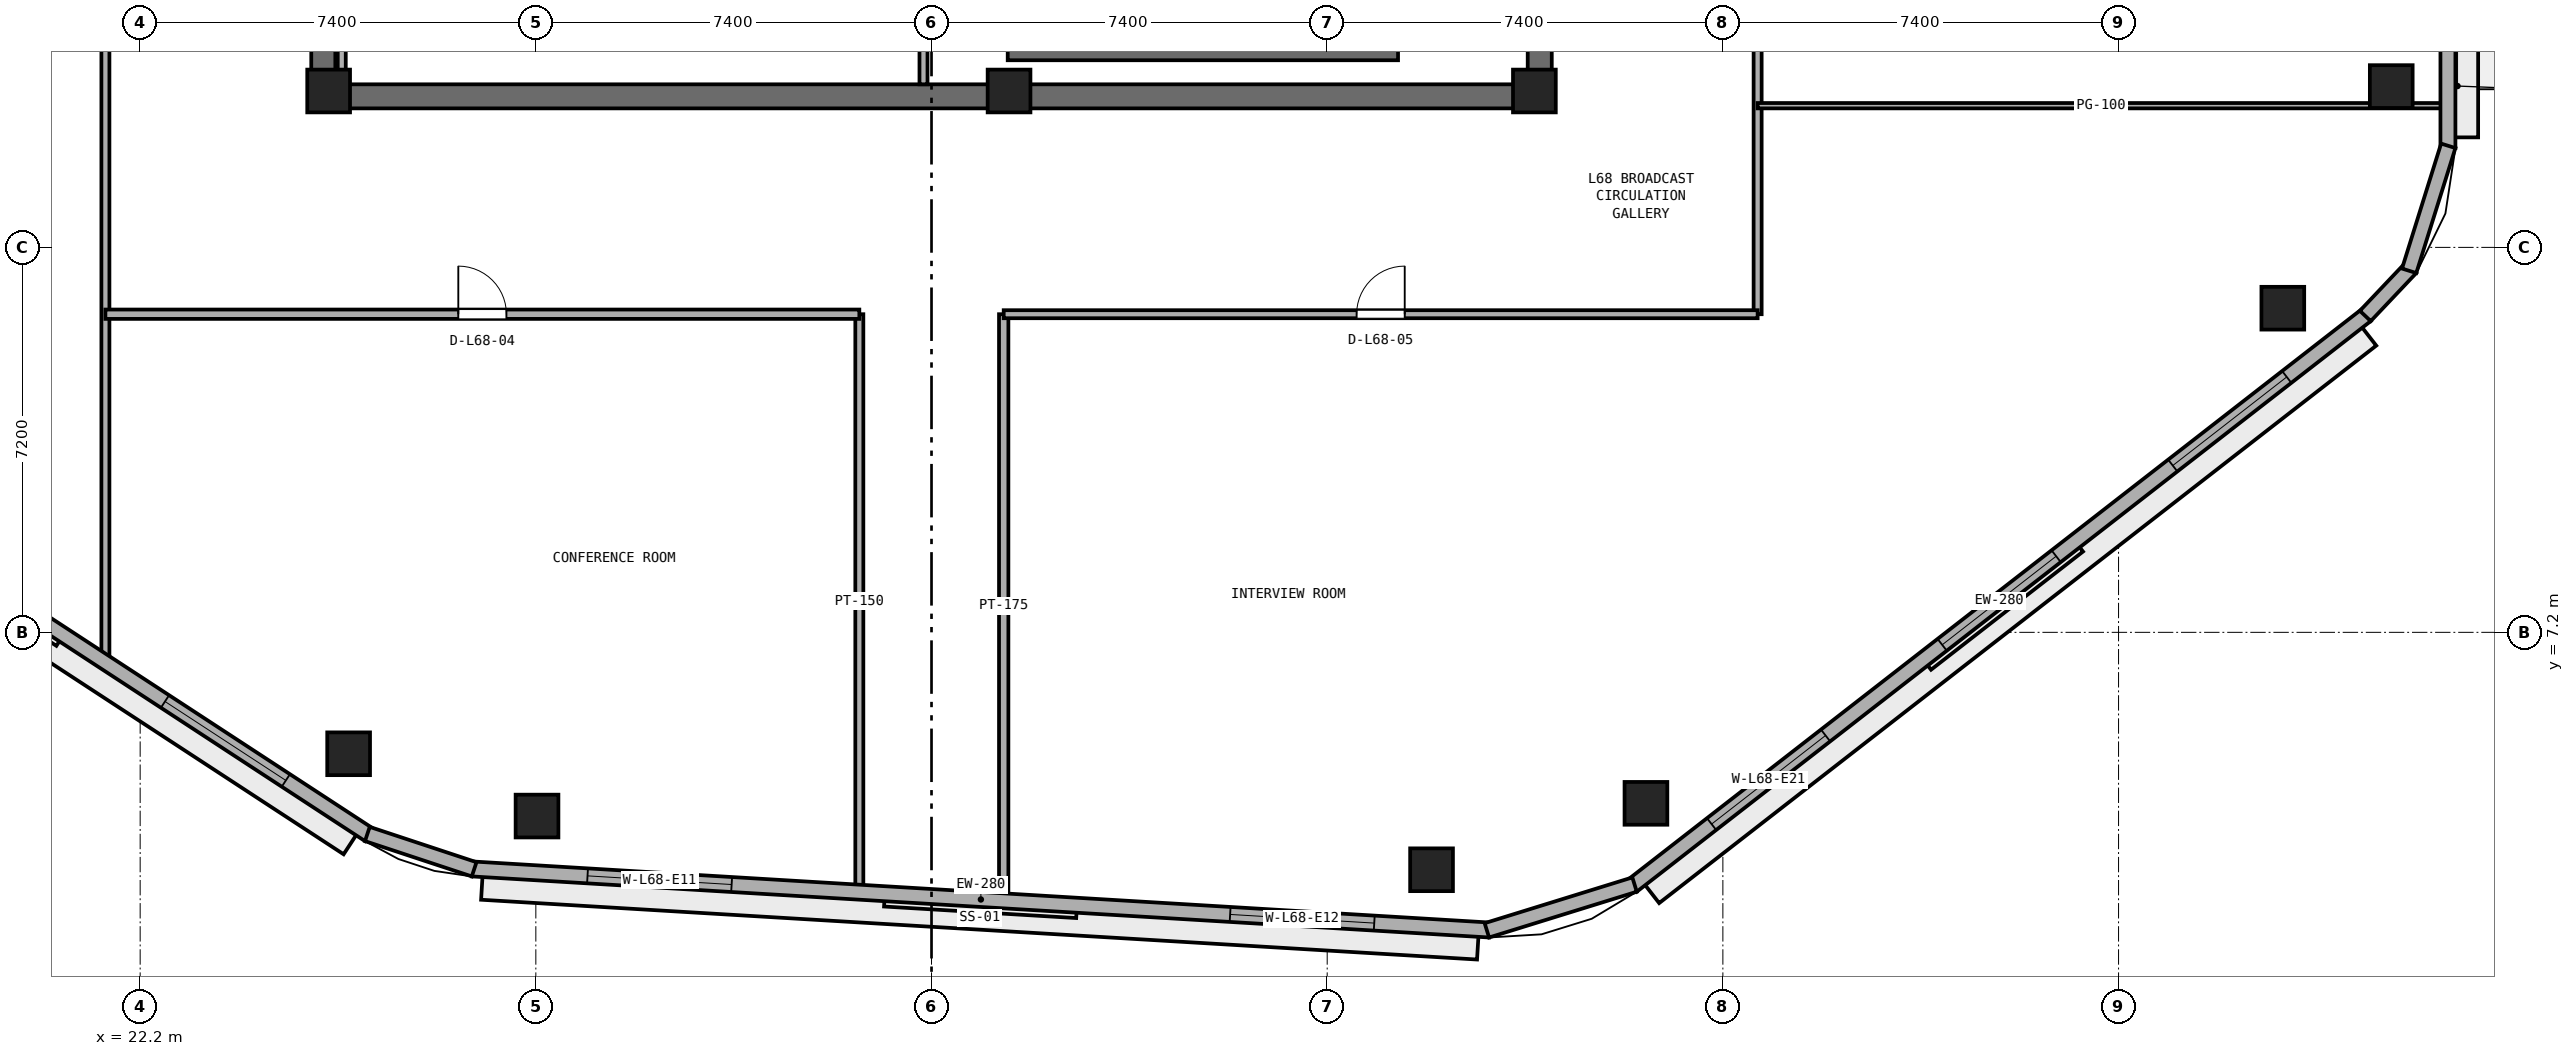
"""IFC4 building model, lengths in metres.
Left out: names, types, materials, properties, quantities, classifications, styles, units other than length and angle.
Written with IfcOpenShell. Run it as: python <this file> out.ifc"""

import sys

from ifc_helpers import new_model, si_unit, direction, frame, frame_2d, origin, origin_2d, place, context, subcontext, project, spatial, rectangle, extrude, element, fill, save


model = new_model("IFC4")
c1 = context("Model", 3, precision=1e-05, world=origin(), true_north=direction((0.0, 1.0)))
c2 = subcontext(c1, "Body", "Model", "MODEL_VIEW")
j1 = project(units=[si_unit("LENGTHUNIT", "METRE"), si_unit("PLANEANGLEUNIT", "RADIAN")], contexts=[c1])
p1 = place(None, origin())
s1 = spatial("IfcSite", under=j1, at=p1, CompositionType="ELEMENT")
p2 = place(p1, origin())
s2 = spatial("IfcBuilding", under=s1, at=p2, CompositionType="ELEMENT")
p3 = place(p2, frame((0.0, 0.0, 266.8)))
s3 = spatial("IfcBuildingStorey", under=s2, at=p3, CompositionType="ELEMENT", Elevation=266.8)
p4 = place(p3, frame((25.4, 17.225, 0.0), z_axis=(0.0, 0.0, 1.0), x_axis=(1.0, 0.0, 0.0)))
e1 = element("IfcWall", 1, at=p4, inside=s3, PredefinedType="SHEAR", context=c2, shape_type="SweptSolid", body=[
    extrude(rectangle(XDim=23.2, YDim=0.45, at=frame_2d((11.6, 0.0))), origin(), (0.0, 0.0, 1.0), 3.51),
])
p5 = place(p3, frame((25.625, 17.45, 0.0), z_axis=(0.0, 0.0, 1.0), x_axis=(0.0, 1.0, 0.0)))
e2 = element("IfcWall", 2, at=p5, inside=s3, PredefinedType="SHEAR", context=c2, shape_type="SweptSolid", body=[
    extrude(rectangle(XDim=15.5, YDim=0.45, at=frame_2d((7.75, 0.0))), origin(), (0.0, 0.0, 1.0), 3.51),
])
p6 = place(p5, frame((7.0, 0.0, 0.0)))
e3 = element("IfcOpeningElement", 3, at=p6, cuts=e2, PredefinedType="OPENING", context=c2, shape_type="SweptSolid", body=[
    extrude(rectangle(XDim=1.5, YDim=2.15, at=frame_2d((0.75, 1.075))), frame((0.0, 0.235, 0.0), z_axis=(0.0, -1.0, 0.0), x_axis=(1.0, 0.0, 0.0)), (0.0, 0.0, 1.0), 0.47),
])
p7 = place(p3, frame((48.375, 17.45, 0.0), z_axis=(0.0, 0.0, 1.0), x_axis=(0.0, 1.0, 0.0)))
e4 = element("IfcWall", 4, at=p7, inside=s3, PredefinedType="SHEAR", context=c2, shape_type="SweptSolid", body=[
    extrude(rectangle(XDim=15.5, YDim=0.45, at=frame_2d((7.75, 0.0))), origin(), (0.0, 0.0, 1.0), 3.51),
])
p8 = place(p7, frame((5.85, 0.0, 0.0)))
e5 = element("IfcOpeningElement", 5, at=p8, cuts=e4, PredefinedType="OPENING", context=c2, shape_type="SweptSolid", body=[
    extrude(rectangle(XDim=1.5, YDim=2.15, at=frame_2d((0.75, 1.075))), frame((0.0, 0.235, 0.0), z_axis=(0.0, -1.0, 0.0), x_axis=(1.0, 0.0, 0.0)), (0.0, 0.0, 1.0), 0.47),
])
for number, where, z_axis, x_axis in (
    (6, (25.725, 17.325, 0.0), (0.0, 0.0, 1.0), (1.0, 0.0, 0.0)),
    (7, (38.45, 17.325, 0.0), (0.0, 0.0, 1.0), (1.0, 0.0, 0.0)),
    (8, (48.275, 17.325, 0.0), (0.0, 0.0, 1.0), (1.0, 0.0, 0.0)),
):
    element("IfcColumn", number, at=place(p3, frame(where, z_axis=z_axis, x_axis=x_axis)), inside=s3, PredefinedType="PILASTER", context=c2, shape_type="SweptSolid", body=[
        extrude(rectangle(XDim=0.8, YDim=0.8, at=origin_2d()), origin(), (0.0, 0.0, 1.0), 3.8),
    ])
for number, where, z_axis, x_axis in (
    (9, (29.622, 3.764, 0.0), (0.0, 0.0, 1.0), (1.0, 0.0, 0.0)),
    (10, (46.352, 2.76, 0.0), (0.0, 0.0, 1.0), (1.0, 0.0, 0.0)),
    (11, (50.361, 4.002, 0.0), (0.0, 0.0, 1.0), (1.0, 0.0, 0.0)),
    (12, (62.272, 13.262, 0.0), (0.0, 0.0, 1.0), (1.0, 0.0, 0.0)),
    (13, (64.3, 17.408, 0.0), (0.0, 0.0, 1.0), (1.0, 0.0, 0.0)),
    (14, (26.099, 4.929, 0.0), (0.0, 0.0, 1.0), (1.0, 0.0, 0.0)),
):
    element("IfcColumn", number, at=place(p3, frame(where, z_axis=z_axis, x_axis=x_axis)), inside=s3, PredefinedType="COLUMN", context=c2, shape_type="SweptSolid", body=[
        extrude(rectangle(XDim=0.8, YDim=0.8, at=origin_2d()), origin(), (0.0, 0.0, 1.0), 3.8),
    ])
p9 = place(p3, frame((38.425, 18.025, 0.0), z_axis=(0.0, 0.0, 1.0), x_axis=(1.0, 0.0, 0.0)))
e15 = element("IfcWall", 15, at=p9, inside=s3, PredefinedType="SHEAR", context=c2, shape_type="SweptSolid", body=[
    extrude(rectangle(XDim=7.3, YDim=0.25, at=frame_2d((3.65, 0.0))), origin(), (0.0, 0.0, 1.0), 3.51),
])
p10 = place(p3, frame((25.97, 17.45, 0.0), z_axis=(0.0, 0.0, 1.0), x_axis=(0.0, 1.0, 0.0)))
e16 = element("IfcWall", 16, at=p10, inside=s3, PredefinedType="PARTITIONING", context=c2, shape_type="SweptSolid", body=[
    extrude(rectangle(XDim=2.3, YDim=0.15, at=frame_2d((1.15, 0.0))), origin(), (0.0, 0.0, 1.0), 2.61),
])
p11 = place(p3, frame((36.85, 17.45, 0.0), z_axis=(0.0, 0.0, 1.0), x_axis=(0.0, 1.0, 0.0)))
e17 = element("IfcWall", 17, at=p11, inside=s3, PredefinedType="PARTITIONING", context=c2, shape_type="SweptSolid", body=[
    extrude(rectangle(XDim=2.3, YDim=0.15, at=frame_2d((1.15, 0.0))), origin(), (0.0, 0.0, 1.0), 3.51),
])
p12 = place(p3, frame((52.45, 13.15, 0.0), z_axis=(0.0, 0.0, 1.0), x_axis=(0.0, 1.0, 0.0)))
e18 = element("IfcWall", 18, at=p12, inside=s3, PredefinedType="PARTITIONING", context=c2, shape_type="SweptSolid", body=[
    extrude(rectangle(XDim=14.65, YDim=0.15, at=frame_2d((7.325, 0.0))), origin(), (0.0, 0.0, 1.0), 3.51),
])
p13 = place(p12, frame((8.575, 0.0, 0.0)))
e19 = element("IfcOpeningElement", 19, at=p13, cuts=e18, PredefinedType="OPENING", context=c2, shape_type="SweptSolid", body=[
    extrude(rectangle(XDim=0.9, YDim=2.1, at=frame_2d((0.45, 1.05))), frame((0.0, 0.085, 0.0), z_axis=(0.0, -1.0, 0.0), x_axis=(1.0, 0.0, 0.0)), (0.0, 0.0, 1.0), 0.17),
])
p14 = place(p3, frame((38.35, 2.243, 0.0), z_axis=(0.0, 0.0, 1.0), x_axis=(0.0, 1.0, 0.0)))
e20 = element("IfcWall", 20, at=p14, inside=s3, PredefinedType="PARTITIONING", context=c2, shape_type="SweptSolid", body=[
    extrude(rectangle(XDim=10.907, YDim=0.175, at=frame_2d((5.454, 0.0))), origin(), (0.0, 0.0, 1.0), 3.51),
])
p15 = place(p3, frame((35.65, 2.405, 0.0), z_axis=(0.0, 0.0, 1.0), x_axis=(0.0, 1.0, 0.0)))
e21 = element("IfcWall", 21, at=p15, inside=s3, PredefinedType="PARTITIONING", context=c2, shape_type="SweptSolid", body=[
    extrude(rectangle(XDim=10.745, YDim=0.15, at=frame_2d((5.373, 0.0))), origin(), (0.0, 0.0, 1.0), 3.51),
])
p16 = place(p3, frame((21.55, 6.608, 0.0), z_axis=(0.0, 0.0, 1.0), x_axis=(0.0, 1.0, 0.0)))
e22 = element("IfcWall", 22, at=p16, inside=s3, PredefinedType="PARTITIONING", context=c2, shape_type="SweptSolid", body=[
    extrude(rectangle(XDim=36.883, YDim=0.15, at=frame_2d((18.441, 0.0))), origin(), (0.0, 0.0, 1.0), 3.51),
])
p17 = place(p16, frame((14.067, 0.0, 0.0)))
e23 = element("IfcOpeningElement", 23, at=p17, cuts=e22, PredefinedType="OPENING", context=c2, shape_type="SweptSolid", body=[
    extrude(rectangle(XDim=0.9, YDim=2.1, at=frame_2d((0.45, 1.05))), frame((0.0, 0.085, 0.0), z_axis=(0.0, -1.0, 0.0), x_axis=(1.0, 0.0, 0.0)), (0.0, 0.0, 1.0), 0.17),
])
p18 = place(p16, frame((26.117, 0.0, 0.0)))
e24 = element("IfcOpeningElement", 24, at=p18, cuts=e22, PredefinedType="OPENING", context=c2, shape_type="SweptSolid", body=[
    extrude(rectangle(XDim=0.9, YDim=2.1, at=frame_2d((0.45, 1.05))), frame((0.0, 0.085, 0.0), z_axis=(0.0, -1.0, 0.0), x_axis=(1.0, 0.0, 0.0)), (0.0, 0.0, 1.0), 0.17),
])
p19 = place(p3, frame((21.55, 13.15, 0.0), z_axis=(0.0, 0.0, 1.0), x_axis=(1.0, 0.0, 0.0)))
e25 = element("IfcWall", 25, at=p19, inside=s3, PredefinedType="PARTITIONING", context=c2, shape_type="SweptSolid", body=[
    extrude(rectangle(XDim=14.1, YDim=0.175, at=frame_2d((7.05, 0.0))), origin(), (0.0, 0.0, 1.0), 3.51),
])
p20 = place(p19, frame((6.6, 0.0, 0.0)))
e26 = element("IfcOpeningElement", 26, at=p20, cuts=e25, PredefinedType="OPENING", context=c2, shape_type="SweptSolid", body=[
    extrude(rectangle(XDim=0.9, YDim=2.1, at=frame_2d((0.45, 1.05))), frame((0.0, 0.097, 0.0), z_axis=(0.0, -1.0, 0.0), x_axis=(1.0, 0.0, 0.0)), (0.0, 0.0, 1.0), 0.195),
])
p21 = place(p3, frame((38.35, 13.15, 0.0), z_axis=(0.0, 0.0, 1.0), x_axis=(1.0, 0.0, 0.0)))
e27 = element("IfcWall", 27, at=p21, inside=s3, PredefinedType="PARTITIONING", context=c2, shape_type="SweptSolid", body=[
    extrude(rectangle(XDim=14.1, YDim=0.15, at=frame_2d((7.05, 0.0))), origin(), (0.0, 0.0, 1.0), 3.51),
])
p22 = place(p21, frame((6.6, 0.0, 0.0)))
e28 = element("IfcOpeningElement", 28, at=p22, cuts=e27, PredefinedType="OPENING", context=c2, shape_type="SweptSolid", body=[
    extrude(rectangle(XDim=0.9, YDim=2.1, at=frame_2d((0.45, 1.05))), frame((0.0, 0.085, 0.0), z_axis=(0.0, -1.0, 0.0), x_axis=(1.0, 0.0, 0.0)), (0.0, 0.0, 1.0), 0.17),
])
p23 = place(p3, frame((52.45, 17.05, 0.0), z_axis=(0.0, 0.0, 1.0), x_axis=(1.0, 0.0, 0.0)))
e29 = element("IfcWall", 29, at=p23, inside=s3, PredefinedType="PARTITIONING", context=c2, shape_type="SweptSolid", body=[
    extrude(rectangle(XDim=12.845, YDim=0.1, at=frame_2d((6.422, 0.0))), origin(), (0.0, 0.0, 1.0), 3.51),
])
p24 = place(p3, frame((28.411, 2.774, 0.0), z_axis=(0.0, 0.0, 1.0), x_axis=(0.998203068368, -0.059921901676, 0.0)))
e30 = element("IfcWall", 30, at=p24, inside=s3, PredefinedType="STANDARD", context=c2, shape_type="SweptSolid", body=[
    extrude(rectangle(XDim=19.06, YDim=0.28, at=frame_2d((9.53, 0.0))), origin(), (0.0, 0.0, 1.0), 3.51),
])
p25 = place(p24, frame((2.16, 0.0, 0.9)))
e31 = element("IfcOpeningElement", 31, at=p25, cuts=e30, PredefinedType="OPENING", context=c2, shape_type="SweptSolid", body=[
    extrude(rectangle(XDim=2.7, YDim=1.75, at=frame_2d((1.35, 0.875))), frame((0.0, 0.15, 0.0), z_axis=(0.0, -1.0, 0.0), x_axis=(1.0, 0.0, 0.0)), (0.0, 0.0, 1.0), 0.3),
])
p26 = place(p24, frame((14.2, 0.0, 0.9)))
e32 = element("IfcOpeningElement", 32, at=p26, cuts=e30, PredefinedType="OPENING", context=c2, shape_type="SweptSolid", body=[
    extrude(rectangle(XDim=2.7, YDim=1.75, at=frame_2d((1.35, 0.875))), frame((0.0, 0.15, 0.0), z_axis=(0.0, -1.0, 0.0), x_axis=(1.0, 0.0, 0.0)), (0.0, 0.0, 1.0), 0.3),
])
p27 = place(p3, frame((50.104, 2.459, 0.0), z_axis=(0.0, 0.0, 1.0), x_axis=(0.789464857485, 0.613795763097, 0.0)))
e33 = element("IfcWall", 33, at=p27, inside=s3, PredefinedType="STANDARD", context=c2, shape_type="SweptSolid", body=[
    extrude(rectangle(XDim=17.387, YDim=0.28, at=frame_2d((8.694, 0.0))), origin(), (0.0, 0.0, 1.0), 3.51),
])
p28 = place(p27, frame((1.881, 0.0, 0.9)))
e34 = element("IfcOpeningElement", 34, at=p28, cuts=e33, PredefinedType="OPENING", context=c2, shape_type="SweptSolid", body=[
    extrude(rectangle(XDim=2.7, YDim=1.75, at=frame_2d((1.35, 0.875))), frame((0.0, 0.15, 0.0), z_axis=(0.0, -1.0, 0.0), x_axis=(1.0, 0.0, 0.0)), (0.0, 0.0, 1.0), 0.3),
])
p29 = place(p27, frame((7.344, 0.0, 0.9)))
e35 = element("IfcOpeningElement", 35, at=p29, cuts=e33, PredefinedType="OPENING", context=c2, shape_type="SweptSolid", body=[
    extrude(rectangle(XDim=2.7, YDim=1.75, at=frame_2d((1.35, 0.875))), frame((0.0, 0.15, 0.0), z_axis=(0.0, -1.0, 0.0), x_axis=(1.0, 0.0, 0.0)), (0.0, 0.0, 1.0), 0.3),
])
p30 = place(p27, frame((12.806, 0.0, 0.9)))
e36 = element("IfcOpeningElement", 36, at=p30, cuts=e33, PredefinedType="OPENING", context=c2, shape_type="SweptSolid", body=[
    extrude(rectangle(XDim=2.7, YDim=1.75, at=frame_2d((1.35, 0.875))), frame((0.0, 0.15, 0.0), z_axis=(0.0, -1.0, 0.0), x_axis=(1.0, 0.0, 0.0)), (0.0, 0.0, 1.0), 0.3),
])
p31 = place(p3, frame((65.36, 16.258, 0.0), z_axis=(0.0, 0.0, 1.0), x_axis=(0.0, 1.0, 0.0)))
e37 = element("IfcWall", 37, at=p31, inside=s3, PredefinedType="STANDARD", context=c2, shape_type="SweptSolid", body=[
    extrude(rectangle(XDim=19.168, YDim=0.28, at=frame_2d((9.584, 0.0))), origin(), (0.0, 0.0, 1.0), 3.51),
])
p32 = place(p31, frame((9.034, 0.0, 0.0)))
e38 = element("IfcOpeningElement", 38, at=p32, cuts=e37, PredefinedType="OPENING", context=c2, shape_type="SweptSolid", body=[
    extrude(rectangle(XDim=1.1, YDim=2.2, at=frame_2d((0.55, 1.1))), frame((0.0, 0.15, 0.0), z_axis=(0.0, -1.0, 0.0), x_axis=(1.0, 0.0, 0.0)), (0.0, 0.0, 1.0), 0.3),
])
p33 = place(p31, frame((2.178, 0.0, 0.9)))
e39 = element("IfcOpeningElement", 39, at=p33, cuts=e37, PredefinedType="OPENING", context=c2, shape_type="SweptSolid", body=[
    extrude(rectangle(XDim=2.7, YDim=1.75, at=frame_2d((1.35, 0.875))), frame((0.0, 0.15, 0.0), z_axis=(0.0, -1.0, 0.0), x_axis=(1.0, 0.0, 0.0)), (0.0, 0.0, 1.0), 0.3),
])
p34 = place(p31, frame((14.04, 0.0, 0.9)))
e40 = element("IfcOpeningElement", 40, at=p34, cuts=e37, PredefinedType="OPENING", context=c2, shape_type="SweptSolid", body=[
    extrude(rectangle(XDim=2.7, YDim=1.75, at=frame_2d((1.35, 0.875))), frame((0.0, 0.15, 0.0), z_axis=(0.0, -1.0, 0.0), x_axis=(1.0, 0.0, 0.0)), (0.0, 0.0, 1.0), 0.3),
])
p35 = place(p3, frame((12.034, 12.854, 0.0), z_axis=(0.0, 0.0, 1.0), x_axis=(0.837118352984, -0.547021812269, 0.0)))
e41 = element("IfcWall", 41, at=p35, inside=s3, PredefinedType="STANDARD", context=c2, shape_type="SweptSolid", body=[
    extrude(rectangle(XDim=17.259, YDim=0.28, at=frame_2d((8.63, 0.0))), origin(), (0.0, 0.0, 1.0), 3.51),
])
p36 = place(p35, frame((1.86, 0.0, 0.9)))
e42 = element("IfcOpeningElement", 42, at=p36, cuts=e41, PredefinedType="OPENING", context=c2, shape_type="SweptSolid", body=[
    extrude(rectangle(XDim=2.7, YDim=1.75, at=frame_2d((1.35, 0.875))), frame((0.0, 0.15, 0.0), z_axis=(0.0, -1.0, 0.0), x_axis=(1.0, 0.0, 0.0)), (0.0, 0.0, 1.0), 0.3),
])
p37 = place(p35, frame((7.28, 0.0, 0.9)))
e43 = element("IfcOpeningElement", 43, at=p37, cuts=e41, PredefinedType="OPENING", context=c2, shape_type="SweptSolid", body=[
    extrude(rectangle(XDim=2.7, YDim=1.75, at=frame_2d((1.35, 0.875))), frame((0.0, 0.15, 0.0), z_axis=(0.0, -1.0, 0.0), x_axis=(1.0, 0.0, 0.0)), (0.0, 0.0, 1.0), 0.3),
])
p38 = place(p35, frame((12.699, 0.0, 0.9)))
e44 = element("IfcOpeningElement", 44, at=p38, cuts=e41, PredefinedType="OPENING", context=c2, shape_type="SweptSolid", body=[
    extrude(rectangle(XDim=2.7, YDim=1.75, at=frame_2d((1.35, 0.875))), frame((0.0, 0.15, 0.0), z_axis=(0.0, -1.0, 0.0), x_axis=(1.0, 0.0, 0.0)), (0.0, 0.0, 1.0), 0.3),
])
p39 = place(p3, frame((47.386, 1.626, 0.0), z_axis=(0.0, 0.0, 1.0), x_axis=(0.955189316149, 0.29599555793, 0.0)))
e45 = element("IfcWall", 45, at=p39, inside=s3, PredefinedType="STANDARD", context=c2, shape_type="SweptSolid", body=[
    extrude(rectangle(XDim=2.892, YDim=0.28, at=frame_2d((1.446, 0.0))), origin(), (0.0, 0.0, 1.0), 3.51),
])
p40 = place(p3, frame((63.815, 13.117, 0.0), z_axis=(0.0, 0.0, 1.0), x_axis=(0.687733716128, 0.725963040176, 0.0)))
e46 = element("IfcWall", 46, at=p40, inside=s3, PredefinedType="STANDARD", context=c2, shape_type="SweptSolid", body=[
    extrude(rectangle(XDim=1.239, YDim=0.28, at=frame_2d((0.62, 0.0))), origin(), (0.0, 0.0, 1.0), 3.51),
])
p41 = place(p3, frame((64.635, 13.962, 0.0), z_axis=(0.0, 0.0, 1.0), x_axis=(0.298649578722, 0.954362839348, 0.0)))
e47 = element("IfcWall", 47, at=p41, inside=s3, PredefinedType="STANDARD", context=c2, shape_type="SweptSolid", body=[
    extrude(rectangle(XDim=2.449, YDim=0.28, at=frame_2d((1.225, 0.0))), origin(), (0.0, 0.0, 1.0), 3.51),
])
p42 = place(p3, frame((26.449, 3.428, 0.0), z_axis=(0.0, 0.0, 1.0), x_axis=(0.949435039229, -0.313963542923, 0.0)))
e48 = element("IfcWall", 48, at=p42, inside=s3, PredefinedType="STANDARD", context=c2, shape_type="SweptSolid", body=[
    extrude(rectangle(XDim=2.104, YDim=0.28, at=frame_2d((1.052, 0.0))), origin(), (0.0, 0.0, 1.0), 3.51),
])
p43 = place(p20, origin())
e49 = element("IfcDoor", 49, at=p43, inside=s3, OperationType="SINGLE_SWING_LEFT", PredefinedType="DOOR", context=c2, shape_type="SweptSolid", body=[
    extrude(rectangle(XDim=0.9, YDim=2.1, at=frame_2d((0.45, 1.05))), frame((0.0, 0.025, 0.0), z_axis=(0.0, -1.0, 0.0), x_axis=(1.0, 0.0, 0.0)), (0.0, 0.0, 1.0), 0.05),
])
fill(e26, e49)
p44 = place(p22, origin())
e50 = element("IfcDoor", 50, at=p44, inside=s3, OperationType="SINGLE_SWING_RIGHT", PredefinedType="DOOR", context=c2, shape_type="SweptSolid", body=[
    extrude(rectangle(XDim=0.9, YDim=2.1, at=frame_2d((0.45, 1.05))), frame((0.0, 0.025, 0.0), z_axis=(0.0, -1.0, 0.0), x_axis=(1.0, 0.0, 0.0)), (0.0, 0.0, 1.0), 0.05),
])
fill(e28, e50)
p45 = place(p25, origin())
e51 = element("IfcWindow", 51, at=p45, inside=s3, PartitioningType="SINGLE_PANEL", PredefinedType="WINDOW", context=c2, shape_type="SweptSolid", body=[
    extrude(rectangle(XDim=2.7, YDim=1.75, at=frame_2d((1.35, 0.875))), frame((0.0, 0.03, 0.0), z_axis=(0.0, -1.0, 0.0), x_axis=(1.0, 0.0, 0.0)), (0.0, 0.0, 1.0), 0.06),
])
fill(e31, e51)
p46 = place(p26, origin())
e52 = element("IfcWindow", 52, at=p46, inside=s3, PartitioningType="SINGLE_PANEL", PredefinedType="WINDOW", context=c2, shape_type="SweptSolid", body=[
    extrude(rectangle(XDim=2.7, YDim=1.75, at=frame_2d((1.35, 0.875))), frame((0.0, 0.03, 0.0), z_axis=(0.0, -1.0, 0.0), x_axis=(1.0, 0.0, 0.0)), (0.0, 0.0, 1.0), 0.06),
])
fill(e32, e52)
p47 = place(p28, origin())
e53 = element("IfcWindow", 53, at=p47, inside=s3, PartitioningType="SINGLE_PANEL", PredefinedType="WINDOW", context=c2, shape_type="SweptSolid", body=[
    extrude(rectangle(XDim=2.7, YDim=1.75, at=frame_2d((1.35, 0.875))), frame((0.0, 0.03, 0.0), z_axis=(0.0, -1.0, 0.0), x_axis=(1.0, 0.0, 0.0)), (0.0, 0.0, 1.0), 0.06),
])
fill(e34, e53)
p48 = place(p29, origin())
e54 = element("IfcWindow", 54, at=p48, inside=s3, PartitioningType="SINGLE_PANEL", PredefinedType="WINDOW", context=c2, shape_type="SweptSolid", body=[
    extrude(rectangle(XDim=2.7, YDim=1.75, at=frame_2d((1.35, 0.875))), frame((0.0, 0.03, 0.0), z_axis=(0.0, -1.0, 0.0), x_axis=(1.0, 0.0, 0.0)), (0.0, 0.0, 1.0), 0.06),
])
fill(e35, e54)
p49 = place(p30, origin())
e55 = element("IfcWindow", 55, at=p49, inside=s3, PartitioningType="SINGLE_PANEL", PredefinedType="WINDOW", context=c2, shape_type="SweptSolid", body=[
    extrude(rectangle(XDim=2.7, YDim=1.75, at=frame_2d((1.35, 0.875))), frame((0.0, 0.03, 0.0), z_axis=(0.0, -1.0, 0.0), x_axis=(1.0, 0.0, 0.0)), (0.0, 0.0, 1.0), 0.06),
])
fill(e36, e55)
p50 = place(p38, origin())
e56 = element("IfcWindow", 56, at=p50, inside=s3, PartitioningType="SINGLE_PANEL", PredefinedType="WINDOW", context=c2, shape_type="SweptSolid", body=[
    extrude(rectangle(XDim=2.7, YDim=1.75, at=frame_2d((1.35, 0.875))), frame((0.0, 0.03, 0.0), z_axis=(0.0, -1.0, 0.0), x_axis=(1.0, 0.0, 0.0)), (0.0, 0.0, 1.0), 0.06),
])
fill(e44, e56)
save(model, sys.argv[1])
